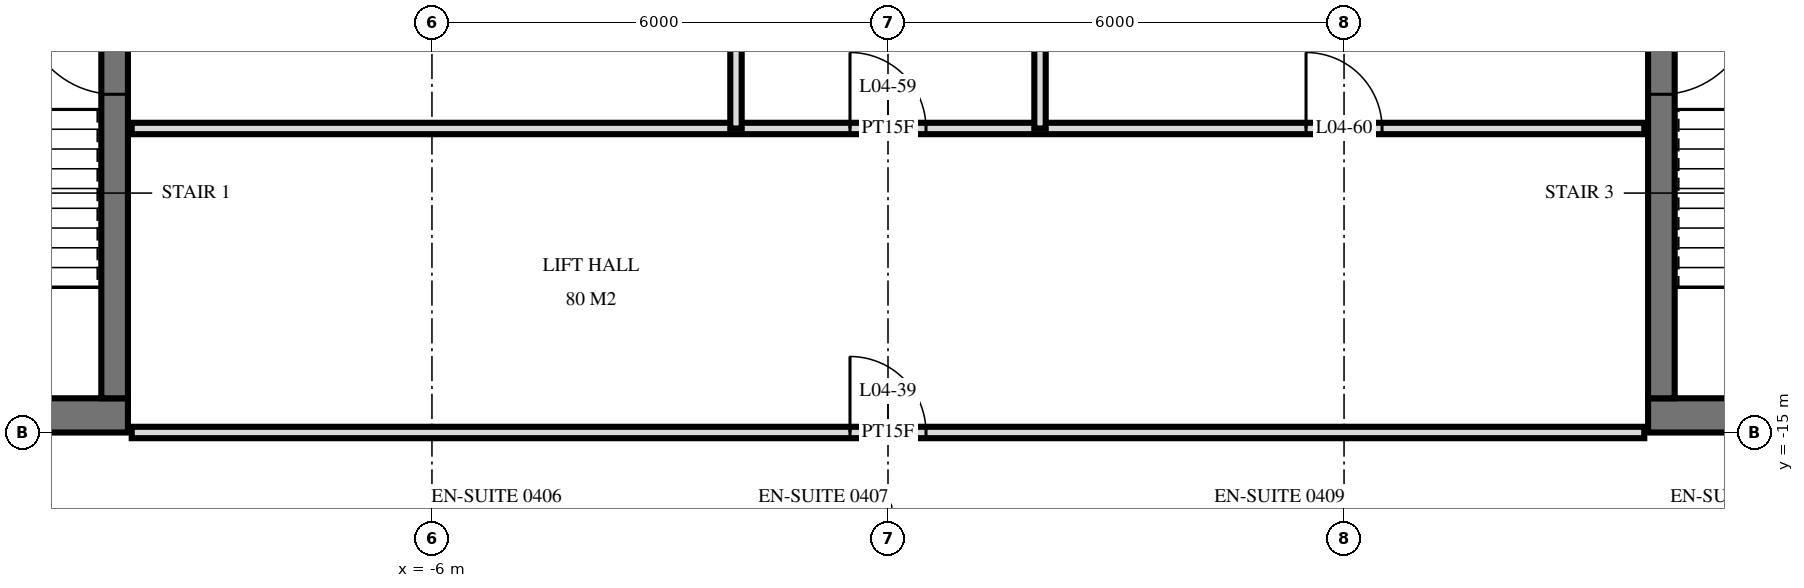
"""IFC4 building model, lengths in metres.
Left out: names, types, materials, properties, quantities, classifications, styles, units other than length and angle.
Written with IfcOpenShell. Run it as: python <this file> out.ifc"""

import sys

from ifc_helpers import new_model, si_unit, direction, frame, frame_2d, origin, place, context, subcontext, project, spatial, rectangle, extrude, element, fill, save


model = new_model("IFC4")
c1 = context("Model", 3, precision=1e-05, world=origin(), true_north=direction((0.0, 1.0)))
c2 = subcontext(c1, "Body", "Model", "MODEL_VIEW")
j1 = project(units=[si_unit("LENGTHUNIT", "METRE"), si_unit("PLANEANGLEUNIT", "RADIAN")], contexts=[c1])
p1 = place(None, origin())
s1 = spatial("IfcSite", under=j1, at=p1, CompositionType="ELEMENT")
p2 = place(p1, origin())
s2 = spatial("IfcBuilding", under=s1, at=p2, CompositionType="ELEMENT")
p3 = place(p2, frame((0.0, 0.0, 24.0)))
s3 = spatial("IfcBuildingStorey", under=s2, at=p3, CompositionType="ELEMENT", Elevation=24.0)
p4 = place(p3, frame((-29.5, -14.775, 0.0), z_axis=(0.0, 0.0, 1.0), x_axis=(1.0, 0.0, 0.0)))
e1 = element("IfcWall", 1, at=p4, inside=s3, PredefinedType="SHEAR", context=c2, shape_type="SweptSolid", body=[
    extrude(rectangle(XDim=19.5, YDim=0.45, at=frame_2d((9.75, 0.0))), origin(), (0.0, 0.0, 1.0), 3.6),
])
p5 = place(p4, frame((11.2, 0.0, 0.0)))
e2 = element("IfcOpeningElement", 2, at=p5, cuts=e1, PredefinedType="OPENING", context=c2, shape_type="SweptSolid", body=[
    extrude(rectangle(XDim=1.2, YDim=2.1, at=frame_2d((0.6, 1.05))), frame((0.0, 0.235, 0.0), z_axis=(0.0, -1.0, 0.0), x_axis=(1.0, 0.0, 0.0)), (0.0, 0.0, 1.0), 0.47),
])
p6 = place(p4, frame((14.25, 0.0, 0.0)))
e3 = element("IfcOpeningElement", 3, at=p6, cuts=e1, PredefinedType="OPENING", context=c2, shape_type="SweptSolid", body=[
    extrude(rectangle(XDim=1.1, YDim=2.1, at=frame_2d((0.55, 1.05))), frame((0.0, 0.235, 0.0), z_axis=(0.0, -1.0, 0.0), x_axis=(1.0, 0.0, 0.0)), (0.0, 0.0, 1.0), 0.47),
])
p7 = place(p4, frame((8.5, 0.0, 0.0)))
e4 = element("IfcOpeningElement", 4, at=p7, cuts=e1, PredefinedType="OPENING", context=c2, shape_type="SweptSolid", body=[
    extrude(rectangle(XDim=0.9, YDim=2.1, at=frame_2d((0.45, 1.05))), frame((0.0, 0.235, 0.0), z_axis=(0.0, -1.0, 0.0), x_axis=(1.0, 0.0, 0.0)), (0.0, 0.0, 1.0), 0.47),
])
p8 = place(p4, frame((6.05, 0.0, 0.0)))
e5 = element("IfcOpeningElement", 5, at=p8, cuts=e1, PredefinedType="OPENING", context=c2, shape_type="SweptSolid", body=[
    extrude(rectangle(XDim=1.0, YDim=2.1, at=frame_2d((0.5, 1.05))), frame((0.0, 0.235, 0.0), z_axis=(0.0, -1.0, 0.0), x_axis=(1.0, 0.0, 0.0)), (0.0, 0.0, 1.0), 0.47),
])
p9 = place(p4, frame((2.25, 0.0, 0.0)))
e6 = element("IfcOpeningElement", 6, at=p9, cuts=e1, PredefinedType="OPENING", context=c2, shape_type="SweptSolid", body=[
    extrude(rectangle(XDim=1.0, YDim=2.1, at=frame_2d((0.5, 1.05))), frame((0.0, 0.235, 0.0), z_axis=(0.0, -1.0, 0.0), x_axis=(1.0, 0.0, 0.0)), (0.0, 0.0, 1.0), 0.47),
])
p10 = place(p3, frame((-10.175, -14.55, 0.0), z_axis=(0.0, 0.0, 1.0), x_axis=(0.0, 1.0, 0.0)))
e7 = element("IfcWall", 7, at=p10, inside=s3, PredefinedType="SHEAR", context=c2, shape_type="SweptSolid", body=[
    extrude(rectangle(XDim=14.1, YDim=0.35, at=frame_2d((7.05, 0.0))), origin(), (0.0, 0.0, 1.0), 3.6),
])
p11 = place(p10, frame((8.4, 0.0, 0.0)))
e8 = element("IfcOpeningElement", 8, at=p11, cuts=e7, PredefinedType="OPENING", context=c2, shape_type="SweptSolid", body=[
    extrude(rectangle(XDim=1.4, YDim=2.4, at=frame_2d((0.7, 1.2))), frame((0.0, 0.185, 0.0), z_axis=(0.0, -1.0, 0.0), x_axis=(1.0, 0.0, 0.0)), (0.0, 0.0, 1.0), 0.37),
])
p12 = place(p10, frame((10.0, 0.0, 0.0)))
e9 = element("IfcOpeningElement", 9, at=p12, cuts=e7, PredefinedType="OPENING", context=c2, shape_type="SweptSolid", body=[
    extrude(rectangle(XDim=1.4, YDim=2.4, at=frame_2d((0.7, 1.2))), frame((0.0, 0.185, 0.0), z_axis=(0.0, -1.0, 0.0), x_axis=(1.0, 0.0, 0.0)), (0.0, 0.0, 1.0), 0.37),
])
p13 = place(p10, frame((4.0, 0.0, 0.0)))
e10 = element("IfcOpeningElement", 10, at=p13, cuts=e7, PredefinedType="OPENING", context=c2, shape_type="SweptSolid", body=[
    extrude(rectangle(XDim=1.2, YDim=2.1, at=frame_2d((0.6, 1.05))), frame((0.0, 0.185, 0.0), z_axis=(0.0, -1.0, 0.0), x_axis=(1.0, 0.0, 0.0)), (0.0, 0.0, 1.0), 0.37),
])
p14 = place(p3, frame((10.0, -14.775, 0.0), z_axis=(0.0, 0.0, 1.0), x_axis=(1.0, 0.0, 0.0)))
e11 = element("IfcWall", 11, at=p14, inside=s3, PredefinedType="SHEAR", context=c2, shape_type="SweptSolid", body=[
    extrude(rectangle(XDim=19.5, YDim=0.45, at=frame_2d((9.75, 0.0))), origin(), (0.0, 0.0, 1.0), 3.6),
])
p15 = place(p14, frame((7.1, 0.0, 0.0)))
e12 = element("IfcOpeningElement", 12, at=p15, cuts=e11, PredefinedType="OPENING", context=c2, shape_type="SweptSolid", body=[
    extrude(rectangle(XDim=1.2, YDim=2.1, at=frame_2d((0.6, 1.05))), frame((0.0, 0.235, 0.0), z_axis=(0.0, -1.0, 0.0), x_axis=(1.0, 0.0, 0.0)), (0.0, 0.0, 1.0), 0.47),
])
p16 = place(p14, frame((4.15, 0.0, 0.0)))
e13 = element("IfcOpeningElement", 13, at=p16, cuts=e11, PredefinedType="OPENING", context=c2, shape_type="SweptSolid", body=[
    extrude(rectangle(XDim=1.1, YDim=2.1, at=frame_2d((0.55, 1.05))), frame((0.0, 0.235, 0.0), z_axis=(0.0, -1.0, 0.0), x_axis=(1.0, 0.0, 0.0)), (0.0, 0.0, 1.0), 0.47),
])
p17 = place(p14, frame((10.1, 0.0, 0.0)))
e14 = element("IfcOpeningElement", 14, at=p17, cuts=e11, PredefinedType="OPENING", context=c2, shape_type="SweptSolid", body=[
    extrude(rectangle(XDim=0.9, YDim=2.1, at=frame_2d((0.45, 1.05))), frame((0.0, 0.235, 0.0), z_axis=(0.0, -1.0, 0.0), x_axis=(1.0, 0.0, 0.0)), (0.0, 0.0, 1.0), 0.47),
])
p18 = place(p14, frame((12.45, 0.0, 0.0)))
e15 = element("IfcOpeningElement", 15, at=p18, cuts=e11, PredefinedType="OPENING", context=c2, shape_type="SweptSolid", body=[
    extrude(rectangle(XDim=1.0, YDim=2.1, at=frame_2d((0.5, 1.05))), frame((0.0, 0.235, 0.0), z_axis=(0.0, -1.0, 0.0), x_axis=(1.0, 0.0, 0.0)), (0.0, 0.0, 1.0), 0.47),
])
p19 = place(p14, frame((16.25, 0.0, 0.0)))
e16 = element("IfcOpeningElement", 16, at=p19, cuts=e11, PredefinedType="OPENING", context=c2, shape_type="SweptSolid", body=[
    extrude(rectangle(XDim=1.0, YDim=2.1, at=frame_2d((0.5, 1.05))), frame((0.0, 0.235, 0.0), z_axis=(0.0, -1.0, 0.0), x_axis=(1.0, 0.0, 0.0)), (0.0, 0.0, 1.0), 0.47),
])
p20 = place(p3, frame((10.175, -14.55, 0.0), z_axis=(0.0, 0.0, 1.0), x_axis=(0.0, 1.0, 0.0)))
e17 = element("IfcWall", 17, at=p20, inside=s3, PredefinedType="SHEAR", context=c2, shape_type="SweptSolid", body=[
    extrude(rectangle(XDim=14.1, YDim=0.35, at=frame_2d((7.05, 0.0))), origin(), (0.0, 0.0, 1.0), 3.6),
])
p21 = place(p20, frame((8.4, 0.0, 0.0)))
e18 = element("IfcOpeningElement", 18, at=p21, cuts=e17, PredefinedType="OPENING", context=c2, shape_type="SweptSolid", body=[
    extrude(rectangle(XDim=1.4, YDim=2.4, at=frame_2d((0.7, 1.2))), frame((0.0, 0.185, 0.0), z_axis=(0.0, -1.0, 0.0), x_axis=(1.0, 0.0, 0.0)), (0.0, 0.0, 1.0), 0.37),
])
p22 = place(p20, frame((10.0, 0.0, 0.0)))
e19 = element("IfcOpeningElement", 19, at=p22, cuts=e17, PredefinedType="OPENING", context=c2, shape_type="SweptSolid", body=[
    extrude(rectangle(XDim=1.4, YDim=2.4, at=frame_2d((0.7, 1.2))), frame((0.0, 0.185, 0.0), z_axis=(0.0, -1.0, 0.0), x_axis=(1.0, 0.0, 0.0)), (0.0, 0.0, 1.0), 0.37),
])
p23 = place(p20, frame((4.0, 0.0, 0.0)))
e20 = element("IfcOpeningElement", 20, at=p23, cuts=e17, PredefinedType="OPENING", context=c2, shape_type="SweptSolid", body=[
    extrude(rectangle(XDim=1.2, YDim=2.1, at=frame_2d((0.6, 1.05))), frame((0.0, 0.185, 0.0), z_axis=(0.0, -1.0, 0.0), x_axis=(1.0, 0.0, 0.0)), (0.0, 0.0, 1.0), 0.37),
])
for number, where, z_axis, x_axis in (
    (21, (2.0, -11.0, 0.0), (0.0, 0.0, 1.0), (0.0, 1.0, 0.0)),
    (22, (-2.0, -11.0, 0.0), (0.0, 0.0, 1.0), (0.0, 1.0, 0.0)),
):
    element("IfcWall", number, at=place(p3, frame(where, z_axis=z_axis, x_axis=x_axis)), inside=s3, PredefinedType="PARTITIONING", context=c2, shape_type="SweptSolid", body=[
        extrude(rectangle(XDim=4.0, YDim=0.15, at=frame_2d((2.0, 0.0))), origin(), (0.0, 0.0, 1.0), 3.32),
    ])
p24 = place(p3, frame((-9.95, -15.0, 0.0), z_axis=(0.0, 0.0, 1.0), x_axis=(1.0, 0.0, 0.0)))
e23 = element("IfcWall", 23, at=p24, inside=s3, PredefinedType="PARTITIONING", context=c2, shape_type="SweptSolid", body=[
    extrude(rectangle(XDim=19.9, YDim=0.15, at=frame_2d((9.95, 0.0))), origin(), (0.0, 0.0, 1.0), 2.684),
])
p25 = place(p24, frame((9.45, 0.0, 0.0)))
e24 = element("IfcOpeningElement", 24, at=p25, cuts=e23, PredefinedType="OPENING", context=c2, shape_type="SweptSolid", body=[
    extrude(rectangle(XDim=1.0, YDim=2.1, at=frame_2d((0.5, 1.05))), frame((0.0, 0.085, 0.0), z_axis=(0.0, -1.0, 0.0), x_axis=(1.0, 0.0, 0.0)), (0.0, 0.0, 1.0), 0.17),
])
p26 = place(p3, frame((-9.95, -11.0, 0.0), z_axis=(0.0, 0.0, 1.0), x_axis=(1.0, 0.0, 0.0)))
e25 = element("IfcWall", 25, at=p26, inside=s3, PredefinedType="PARTITIONING", context=c2, shape_type="SweptSolid", body=[
    extrude(rectangle(XDim=19.9, YDim=0.15, at=frame_2d((9.95, 0.0))), origin(), (0.0, 0.0, 1.0), 3.32),
])
p27 = place(p26, frame((9.45, 0.0, 0.0)))
e26 = element("IfcOpeningElement", 26, at=p27, cuts=e25, PredefinedType="OPENING", context=c2, shape_type="SweptSolid", body=[
    extrude(rectangle(XDim=1.0, YDim=2.1, at=frame_2d((0.5, 1.05))), frame((0.0, 0.085, 0.0), z_axis=(0.0, -1.0, 0.0), x_axis=(1.0, 0.0, 0.0)), (0.0, 0.0, 1.0), 0.17),
])
p28 = place(p26, frame((15.45, 0.0, 0.0)))
e27 = element("IfcOpeningElement", 27, at=p28, cuts=e25, PredefinedType="OPENING", context=c2, shape_type="SweptSolid", body=[
    extrude(rectangle(XDim=1.0, YDim=2.1, at=frame_2d((0.5, 1.05))), frame((0.0, 0.085, 0.0), z_axis=(0.0, -1.0, 0.0), x_axis=(1.0, 0.0, 0.0)), (0.0, 0.0, 1.0), 0.17),
])
p29 = place(p13, origin())
e28 = element("IfcDoor", 28, at=p29, inside=s3, OperationType="SINGLE_SWING_LEFT", PredefinedType="DOOR", context=c2, shape_type="SweptSolid", body=[
    extrude(rectangle(XDim=1.2, YDim=2.1, at=frame_2d((0.6, 1.05))), frame((0.0, 0.025, 0.0), z_axis=(0.0, -1.0, 0.0), x_axis=(1.0, 0.0, 0.0)), (0.0, 0.0, 1.0), 0.05),
])
fill(e10, e28)
p30 = place(p23, frame((0.6, 0.0, 0.0), z_axis=(0.0, 0.0, 1.0), x_axis=(-1.0, 0.0, 0.0)))
e29 = element("IfcDoor", 29, at=p30, inside=s3, OperationType="SINGLE_SWING_RIGHT", PredefinedType="DOOR", context=c2, shape_type="SweptSolid", body=[
    extrude(rectangle(XDim=1.2, YDim=2.1, at=frame_2d((0.0, 1.05))), frame((0.0, -0.025, 0.0), z_axis=(0.0, 1.0, 0.0), x_axis=(-1.0, 0.0, 0.0)), (0.0, 0.0, 1.0), 0.05),
])
fill(e20, e29)
p31 = place(p25, origin())
e30 = element("IfcDoor", 30, at=p31, inside=s3, OperationType="SINGLE_SWING_RIGHT", PredefinedType="DOOR", context=c2, shape_type="SweptSolid", body=[
    extrude(rectangle(XDim=1.0, YDim=2.1, at=frame_2d((0.5, 1.05))), frame((0.0, 0.025, 0.0), z_axis=(0.0, -1.0, 0.0), x_axis=(1.0, 0.0, 0.0)), (0.0, 0.0, 1.0), 0.05),
])
fill(e24, e30)
p32 = place(p27, origin())
e31 = element("IfcDoor", 31, at=p32, inside=s3, OperationType="SINGLE_SWING_RIGHT", PredefinedType="DOOR", context=c2, shape_type="SweptSolid", body=[
    extrude(rectangle(XDim=1.0, YDim=2.1, at=frame_2d((0.5, 1.05))), frame((0.0, 0.025, 0.0), z_axis=(0.0, -1.0, 0.0), x_axis=(1.0, 0.0, 0.0)), (0.0, 0.0, 1.0), 0.05),
])
fill(e26, e31)
p33 = place(p28, origin())
e32 = element("IfcDoor", 32, at=p33, inside=s3, OperationType="SINGLE_SWING_RIGHT", PredefinedType="DOOR", context=c2, shape_type="SweptSolid", body=[
    extrude(rectangle(XDim=1.0, YDim=2.1, at=frame_2d((0.5, 1.05))), frame((0.0, 0.025, 0.0), z_axis=(0.0, -1.0, 0.0), x_axis=(1.0, 0.0, 0.0)), (0.0, 0.0, 1.0), 0.05),
])
fill(e27, e32)
save(model, sys.argv[1])
